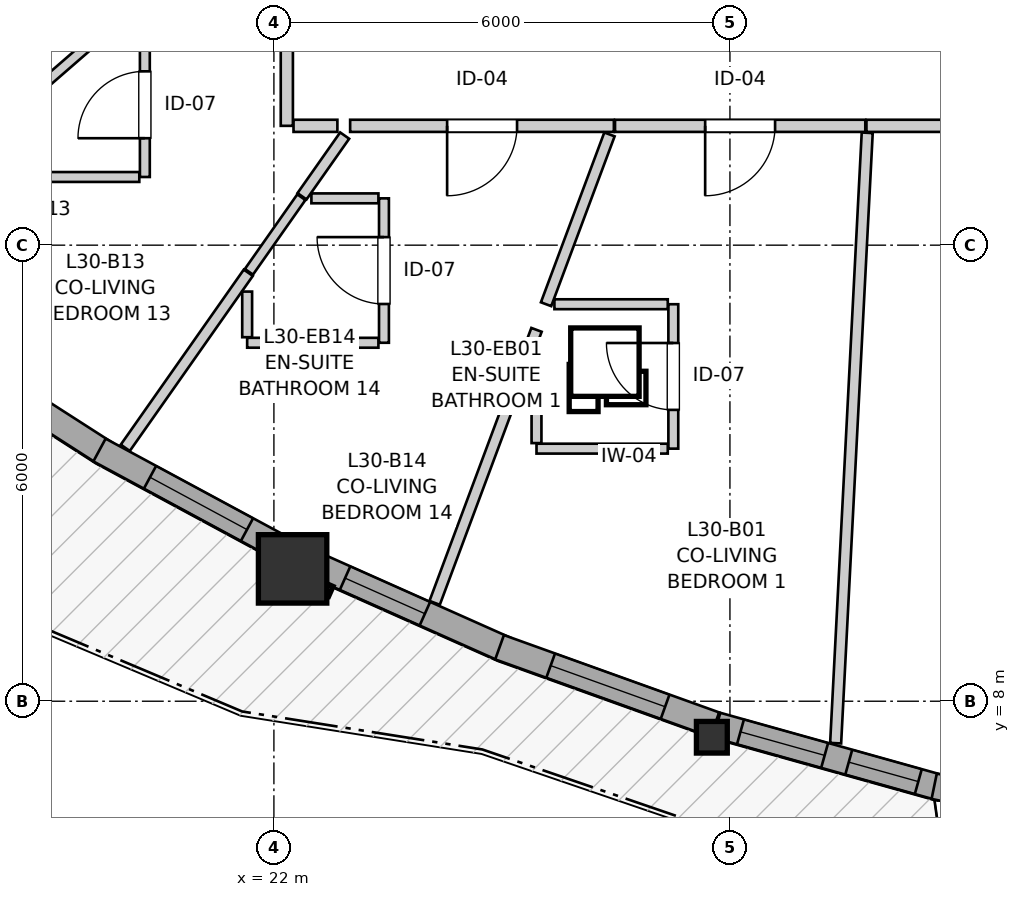
"""IFC4 building model, lengths in metres.
Left out: names, types, materials, properties, quantities, classifications, styles, units other than length and angle.
Written with IfcOpenShell. Run it as: python <this file> out.ifc"""

import sys

from ifc_helpers import new_model, si_unit, direction, frame, frame_2d, origin, origin_2d, place, context, subcontext, project, spatial, rectangle, i_section, extrude, source, transform, mapped, element, fill, save


model = new_model("IFC4")
c1 = context("Model", 3, precision=1e-05, world=origin(), true_north=direction((0.0, 1.0)))
c2 = subcontext(c1, "Body", "Model", "MODEL_VIEW")
j1 = project(units=[si_unit("LENGTHUNIT", "METRE"), si_unit("PLANEANGLEUNIT", "RADIAN")], contexts=[c1])
p1 = place(None, origin())
s1 = spatial("IfcSite", under=j1, at=p1, CompositionType="ELEMENT")
p2 = place(p1, origin())
s2 = spatial("IfcBuilding", under=s1, at=p2, CompositionType="ELEMENT")
p3 = place(p2, frame((0.0, 0.0, 102.4)))
s3 = spatial("IfcBuildingStorey", under=s2, at=p3, CompositionType="ELEMENT", Elevation=102.4)
m1 = source(origin(), c2, "Body", "SweptSolid", [
    extrude(rectangle(XDim=0.9, YDim=0.9, at=origin_2d()), origin(), (0.0, 0.0, 1.0), 2.95),
])
p4 = place(p3, frame((22.246, 9.741, 0.0), z_axis=(0.0, 0.0, 1.0), x_axis=(1.0, 0.0, 0.0)))
e1 = element("IfcColumn", 1, at=p4, inside=s3, PredefinedType="COLUMN", context=c2, shape_type="MappedRepresentation", body=[
    mapped(m1, transform((0.0, 0.0, 0.0), x_axis=(1.0, 0.0, 0.0), y_axis=(0.0, 1.0, 0.0), z_axis=(0.0, 0.0, 1.0), scale=1.0)),
])
m2 = source(origin(), c2, "Body", "SweptSolid", [
    extrude(i_section(OverallWidth=0.406, OverallDepth=0.416, WebThickness=0.027, FlangeThickness=0.044, FilletRadius=0.015, at=origin_2d()), origin(), (0.0, 0.0, 1.0), 2.95),
])
p5 = place(p3, frame((27.762, 7.526, 0.0), z_axis=(0.0, 0.0, 1.0), x_axis=(1.0, 0.0, 0.0)))
e2 = element("IfcColumn", 2, at=p5, inside=s3, PredefinedType="PILASTER", context=c2, shape_type="MappedRepresentation", body=[
    mapped(m2, transform((0.0, 0.0, 0.0), x_axis=(1.0, 0.0, 0.0), y_axis=(0.0, 1.0, 0.0), z_axis=(0.0, 0.0, 1.0), scale=1.0)),
])
p6 = place(p3, frame((17.292, 12.858, 0.0), z_axis=(0.0, 0.0, 1.0), x_axis=(0.841524200167, -0.540219418878, 0.0)))
e3 = element("IfcWall", 3, at=p6, inside=s3, PredefinedType="SOLIDWALL", context=c2, shape_type="SweptSolid", body=[
    extrude(rectangle(XDim=2.958, YDim=0.34, at=frame_2d((1.479, 0.0))), origin(), (0.0, 0.0, 1.0), 2.48),
])
p7 = place(p6, frame((0.944, 0.0, 0.82)))
e4 = element("IfcOpeningElement", 4, at=p7, cuts=e3, PredefinedType="OPENING", context=c2, shape_type="SweptSolid", body=[
    extrude(rectangle(XDim=1.05, YDim=1.45, at=frame_2d((0.525, 0.725))), frame((0.0, 0.18, 0.0), z_axis=(0.0, -1.0, 0.0), x_axis=(1.0, 0.0, 0.0)), (0.0, 0.0, 1.0), 0.36),
])
p8 = place(p3, frame((19.705, 11.305, 0.0), z_axis=(0.0, 0.0, 1.0), x_axis=(0.880065774925, -0.474851799834, 0.0)))
e5 = element("IfcWall", 5, at=p8, inside=s3, PredefinedType="SOLIDWALL", context=c2, shape_type="SweptSolid", body=[
    extrude(rectangle(XDim=2.749, YDim=0.34, at=frame_2d((1.374, 0.0))), origin(), (0.0, 0.0, 1.0), 2.48),
])
p9 = place(p8, frame((0.755, 0.0, 0.82)))
e6 = element("IfcOpeningElement", 6, at=p9, cuts=e5, PredefinedType="OPENING", context=c2, shape_type="SweptSolid", body=[
    extrude(rectangle(XDim=1.45, YDim=1.25, at=frame_2d((0.725, 0.625))), frame((0.0, 0.18, 0.0), z_axis=(0.0, -1.0, 0.0), x_axis=(1.0, 0.0, 0.0)), (0.0, 0.0, 1.0), 0.36),
])
p10 = place(p3, frame((22.525, 9.803, 0.0), z_axis=(0.0, 0.0, 1.0), x_axis=(0.913407022137, -0.407047432016, 0.0)))
e7 = element("IfcWall", 7, at=p10, inside=s3, PredefinedType="SOLIDWALL", context=c2, shape_type="SweptSolid", body=[
    extrude(rectangle(XDim=2.766, YDim=0.34, at=frame_2d((1.383, 0.0))), origin(), (0.0, 0.0, 1.0), 2.48),
])
p11 = place(p10, frame((0.45, 0.0, 0.82)))
e8 = element("IfcOpeningElement", 8, at=p11, cuts=e7, PredefinedType="OPENING", context=c2, shape_type="SweptSolid", body=[
    extrude(rectangle(XDim=1.15, YDim=1.2, at=frame_2d((0.575, 0.6))), frame((0.0, 0.18, 0.0), z_axis=(0.0, -1.0, 0.0), x_axis=(1.0, 0.0, 0.0)), (0.0, 0.0, 1.0), 0.36),
])
p12 = place(p3, frame((24.969, 8.71, 0.0), z_axis=(0.0, 0.0, 1.0), x_axis=(0.94111062187, -0.338098798287, 0.0)))
e9 = element("IfcWall", 9, at=p12, inside=s3, PredefinedType="SOLIDWALL", context=c2, shape_type="SweptSolid", body=[
    extrude(rectangle(XDim=3.009, YDim=0.34, at=frame_2d((1.504, 0.0))), origin(), (0.0, 0.0, 1.0), 2.48),
])
p13 = place(p12, frame((0.714, 0.0, 0.82)))
e10 = element("IfcOpeningElement", 10, at=p13, cuts=e9, PredefinedType="OPENING", context=c2, shape_type="SweptSolid", body=[
    extrude(rectangle(XDim=1.6, YDim=1.35, at=frame_2d((0.8, 0.675))), frame((0.0, 0.18, 0.0), z_axis=(0.0, -1.0, 0.0), x_axis=(1.0, 0.0, 0.0)), (0.0, 0.0, 1.0), 0.36),
])
p14 = place(p3, frame((27.827, 7.684, 0.0), z_axis=(0.0, 0.0, 1.0), x_axis=(0.963051015651, -0.269319032475, 0.0)))
e11 = element("IfcWall", 11, at=p14, inside=s3, PredefinedType="SOLIDWALL", context=c2, shape_type="SweptSolid", body=[
    extrude(rectangle(XDim=3.059, YDim=0.34, at=frame_2d((1.529, 0.0))), origin(), (0.0, 0.0, 1.0), 2.48),
])
p15 = place(p14, frame((0.323, 0.0, 0.82)))
e12 = element("IfcOpeningElement", 12, at=p15, cuts=e11, PredefinedType="OPENING", context=c2, shape_type="SweptSolid", body=[
    extrude(rectangle(XDim=1.15, YDim=1.2, at=frame_2d((0.575, 0.6))), frame((0.0, 0.18, 0.0), z_axis=(0.0, -1.0, 0.0), x_axis=(1.0, 0.0, 0.0)), (0.0, 0.0, 1.0), 0.36),
])
p16 = place(p14, frame((1.803, 0.0, 0.82)))
e13 = element("IfcOpeningElement", 13, at=p16, cuts=e11, PredefinedType="OPENING", context=c2, shape_type="SweptSolid", body=[
    extrude(rectangle(XDim=0.95, YDim=1.35, at=frame_2d((0.475, 0.675))), frame((0.0, 0.18, 0.0), z_axis=(0.0, -1.0, 0.0), x_axis=(1.0, 0.0, 0.0)), (0.0, 0.0, 1.0), 0.36),
])
p17 = place(p3, frame((30.687, 6.881, 0.0), z_axis=(0.0, 0.0, 1.0), x_axis=(0.979429773913, -0.201785326453, 0.0)))
e14 = element("IfcWall", 14, at=p17, inside=s3, PredefinedType="SOLIDWALL", context=c2, shape_type="SweptSolid", body=[
    extrude(rectangle(XDim=2.913, YDim=0.34, at=frame_2d((1.457, 0.0))), origin(), (0.0, 0.0, 1.0), 2.48),
])
p18 = place(p17, frame((0.837, 0.0, 0.82)))
e15 = element("IfcOpeningElement", 15, at=p18, cuts=e14, PredefinedType="OPENING", context=c2, shape_type="SweptSolid", body=[
    extrude(rectangle(XDim=1.25, YDim=1.35, at=frame_2d((0.625, 0.675))), frame((0.0, 0.18, 0.0), z_axis=(0.0, -1.0, 0.0), x_axis=(1.0, 0.0, 0.0)), (0.0, 0.0, 1.0), 0.36),
])
p19 = place(p3, frame((34.373, 15.57, 0.0), z_axis=(0.0, 0.0, 1.0), x_axis=(-1.0, 0.0, 0.0)))
e16 = element("IfcWall", 16, at=p19, inside=s3, PredefinedType="PARTITIONING", context=c2, shape_type="SweptSolid", body=[
    extrude(rectangle(XDim=4.577, YDim=0.16, at=frame_2d((2.289, 0.0))), origin(), (0.0, 0.0, 1.0), 2.95),
])
p20 = place(p19, frame((1.639, 0.0, 0.0)))
e17 = element("IfcOpeningElement", 17, at=p20, cuts=e16, PredefinedType="OPENING", context=c2, shape_type="SweptSolid", body=[
    extrude(rectangle(XDim=1.3, YDim=2.1, at=frame_2d((0.65, 1.05))), frame((0.0, 0.09, 0.0), z_axis=(0.0, -1.0, 0.0), x_axis=(1.0, 0.0, 0.0)), (0.0, 0.0, 1.0), 0.18),
])
p21 = place(p3, frame((26.473, 15.57, 0.0), z_axis=(0.0, 0.0, 1.0), x_axis=(-1.0, 0.0, 0.0)))
e18 = element("IfcWall", 18, at=p21, inside=s3, PredefinedType="PARTITIONING", context=c2, shape_type="SweptSolid", body=[
    extrude(rectangle(XDim=3.47, YDim=0.16, at=frame_2d((1.735, 0.0))), origin(), (0.0, 0.0, 1.0), 2.95),
])
p22 = place(p21, frame((1.274, 0.0, 0.0)))
e19 = element("IfcOpeningElement", 19, at=p22, cuts=e18, PredefinedType="OPENING", context=c2, shape_type="SweptSolid", body=[
    extrude(rectangle(XDim=0.92, YDim=2.1, at=frame_2d((0.46, 1.05))), frame((0.0, 0.09, 0.0), z_axis=(0.0, -1.0, 0.0), x_axis=(1.0, 0.0, 0.0)), (0.0, 0.0, 1.0), 0.18),
])
p23 = place(p3, frame((22.17, 15.57, 0.0), z_axis=(0.0, 0.0, 1.0), x_axis=(0.0, 1.0, 0.0)))
e20 = element("IfcWall", 20, at=p23, inside=s3, PredefinedType="PARTITIONING", context=c2, shape_type="SweptSolid", body=[
    extrude(rectangle(XDim=3.346, YDim=0.16, at=frame_2d((1.673, 0.0))), origin(), (0.0, 0.0, 1.0), 2.95),
])
p24 = place(p23, frame((1.203, 0.0, 0.0)))
e21 = element("IfcOpeningElement", 21, at=p24, cuts=e20, PredefinedType="OPENING", context=c2, shape_type="SweptSolid", body=[
    extrude(rectangle(XDim=0.92, YDim=2.1, at=frame_2d((0.46, 1.05))), frame((0.0, 0.09, 0.0), z_axis=(0.0, -1.0, 0.0), x_axis=(1.0, 0.0, 0.0)), (0.0, 0.0, 1.0), 0.18),
])
p25 = place(p3, frame((29.781, 15.57, 0.0), z_axis=(0.0, 0.0, 1.0), x_axis=(-1.0, 0.0, 0.0)))
e22 = element("IfcWall", 22, at=p25, inside=s3, PredefinedType="PARTITIONING", context=c2, shape_type="SweptSolid", body=[
    extrude(rectangle(XDim=3.293, YDim=0.16, at=frame_2d((1.646, 0.0))), origin(), (0.0, 0.0, 1.0), 2.95),
])
p26 = place(p25, frame((1.187, 0.0, 0.0)))
e23 = element("IfcOpeningElement", 23, at=p26, cuts=e22, PredefinedType="OPENING", context=c2, shape_type="SweptSolid", body=[
    extrude(rectangle(XDim=0.92, YDim=2.1, at=frame_2d((0.46, 1.05))), frame((0.0, 0.09, 0.0), z_axis=(0.0, -1.0, 0.0), x_axis=(1.0, 0.0, 0.0)), (0.0, 0.0, 1.0), 0.18),
])
p27 = place(p3, frame((27.255, 11.323, 0.0), z_axis=(0.0, 0.0, 1.0), x_axis=(0.0, 1.0, 0.0)))
e24 = element("IfcWall", 24, at=p27, inside=s3, PredefinedType="PARTITIONING", context=c2, shape_type="SweptSolid", body=[
    extrude(rectangle(XDim=1.9, YDim=0.13, at=frame_2d((0.95, 0.0))), origin(), (0.0, 0.0, 1.0), 2.95),
])
p28 = place(p27, frame((0.51, 0.0, 0.0)))
e25 = element("IfcOpeningElement", 25, at=p28, cuts=e24, PredefinedType="OPENING", context=c2, shape_type="SweptSolid", body=[
    extrude(rectangle(XDim=0.88, YDim=2.05, at=frame_2d((0.44, 1.025))), frame((0.0, 0.075, 0.0), z_axis=(0.0, -1.0, 0.0), x_axis=(1.0, 0.0, 0.0)), (0.0, 0.0, 1.0), 0.15),
])
p29 = place(p3, frame((20.302, 14.897, 0.0), z_axis=(0.0, 0.0, 1.0), x_axis=(0.0, 1.0, 0.0)))
e26 = element("IfcWall", 26, at=p29, inside=s3, PredefinedType="PARTITIONING", context=c2, shape_type="SweptSolid", body=[
    extrude(rectangle(XDim=1.9, YDim=0.13, at=frame_2d((0.95, 0.0))), origin(), (0.0, 0.0, 1.0), 2.95),
])
p30 = place(p29, frame((0.51, 0.0, 0.0)))
e27 = element("IfcOpeningElement", 27, at=p30, cuts=e26, PredefinedType="OPENING", context=c2, shape_type="SweptSolid", body=[
    extrude(rectangle(XDim=0.88, YDim=2.05, at=frame_2d((0.44, 1.025))), frame((0.0, 0.075, 0.0), z_axis=(0.0, -1.0, 0.0), x_axis=(1.0, 0.0, 0.0)), (0.0, 0.0, 1.0), 0.15),
])
p31 = place(p3, frame((23.448, 12.716, 0.0), z_axis=(0.0, 0.0, 1.0), x_axis=(0.0, 1.0, 0.0)))
e28 = element("IfcWall", 28, at=p31, inside=s3, PredefinedType="PARTITIONING", context=c2, shape_type="SweptSolid", body=[
    extrude(rectangle(XDim=1.9, YDim=0.13, at=frame_2d((0.95, 0.0))), origin(), (0.0, 0.0, 1.0), 2.95),
])
p32 = place(p31, frame((0.51, 0.0, 0.0)))
e29 = element("IfcOpeningElement", 29, at=p32, cuts=e28, PredefinedType="OPENING", context=c2, shape_type="SweptSolid", body=[
    extrude(rectangle(XDim=0.88, YDim=2.05, at=frame_2d((0.44, 1.025))), frame((0.0, 0.075, 0.0), z_axis=(0.0, -1.0, 0.0), x_axis=(1.0, 0.0, 0.0)), (0.0, 0.0, 1.0), 0.15),
])
p33 = place(p3, frame((13.622, 16.028, 0.0), z_axis=(0.0, 0.0, 1.0), x_axis=(0.85896108151, 0.512040877716, 0.0)))
e30 = element("IfcWall", 30, at=p33, inside=s3, PredefinedType="PARTITIONING", context=c2, shape_type="SweptSolid", body=[
    extrude(rectangle(XDim=9.807, YDim=0.145, at=frame_2d((4.904, 0.0))), origin(), (0.0, 0.0, 1.0), 2.95),
])
p34 = place(p3, frame((29.391, 7.448, 0.0), z_axis=(0.0, 0.0, 1.0), x_axis=(0.051677535725, 0.998663823467, 0.0)))
e31 = element("IfcWall", 31, at=p34, inside=s3, PredefinedType="PARTITIONING", context=c2, shape_type="SweptSolid", body=[
    extrude(rectangle(XDim=8.041, YDim=0.145, at=frame_2d((4.021, 0.0))), origin(), (0.0, 0.0, 1.0), 2.95),
])
p35 = place(p3, frame((24.115, 9.294, 0.0), z_axis=(0.0, 0.0, 1.0), x_axis=(0.349559649022, 0.936914111205, 0.0)))
e32 = element("IfcWall", 32, at=p35, inside=s3, PredefinedType="PARTITIONING", context=c2, shape_type="SweptSolid", body=[
    extrude(rectangle(XDim=3.834, YDim=0.145, at=frame_2d((1.917, 0.0))), origin(), (0.0, 0.0, 1.0), 2.95),
])
p36 = place(p3, frame((20.044, 11.334, 0.0), z_axis=(0.0, 0.0, 1.0), x_axis=(0.575027113175, 0.818134352728, 0.0)))
e33 = element("IfcWall", 33, at=p36, inside=s3, PredefinedType="PARTITIONING", context=c2, shape_type="SweptSolid", body=[
    extrude(rectangle(XDim=2.815, YDim=0.145, at=frame_2d((1.407, 0.0))), origin(), (0.0, 0.0, 1.0), 2.95),
])
p37 = place(p3, frame((25.581, 13.223, 0.0), z_axis=(0.0, 0.0, 1.0), x_axis=(0.349597225683, 0.936900090615, 0.0)))
e34 = element("IfcWall", 34, at=p37, inside=s3, PredefinedType="PARTITIONING", context=c2, shape_type="SweptSolid", body=[
    extrude(rectangle(XDim=2.385, YDim=0.145, at=frame_2d((1.192, 0.0))), origin(), (0.0, 0.0, 1.0), 2.95),
])
p38 = place(p3, frame((25.455, 11.323, 0.0), z_axis=(0.0, 0.0, 1.0), x_axis=(1.0, 0.0, 0.0)))
e35 = element("IfcWall", 35, at=p38, inside=s3, PredefinedType="PARTITIONING", context=c2, shape_type="SweptSolid", body=[
    extrude(rectangle(XDim=1.727, YDim=0.13, at=frame_2d((0.863, 0.0))), origin(), (0.0, 0.0, 1.0), 2.558),
])
for number, where, z_axis, x_axis in (
    (36, (18.502, 14.897, 0.0), (0.0, 0.0, 1.0), (1.0, 0.0, 0.0)),
    (37, (21.648, 12.716, 0.0), (0.0, 0.0, 1.0), (1.0, 0.0, 0.0)),
):
    element("IfcWall", number, at=place(p3, frame(where, z_axis=z_axis, x_axis=x_axis)), inside=s3, PredefinedType="PARTITIONING", context=c2, shape_type="SweptSolid", body=[
        extrude(rectangle(XDim=1.727, YDim=0.13, at=frame_2d((0.864, 0.0))), origin(), (0.0, 0.0, 1.0), 2.95),
    ])
p39 = place(p3, frame((25.691, 13.223, 0.0), z_axis=(0.0, 0.0, 1.0), x_axis=(1.0, 0.0, 0.0)))
e38 = element("IfcWall", 38, at=p39, inside=s3, PredefinedType="PARTITIONING", context=c2, shape_type="SweptSolid", body=[
    extrude(rectangle(XDim=1.491, YDim=0.13, at=frame_2d((0.746, 0.0))), origin(), (0.0, 0.0, 1.0), 2.95),
])
p40 = place(p3, frame((18.528, 15.734, 0.0), z_axis=(0.0, 0.0, 1.0), x_axis=(0.755063236967, 0.655651971843, 0.0)))
e39 = element("IfcWall", 39, at=p40, inside=s3, PredefinedType="PARTITIONING", context=c2, shape_type="SweptSolid", body=[
    extrude(rectangle(XDim=1.584, YDim=0.13, at=frame_2d((0.792, 0.0))), origin(), (0.0, 0.0, 1.0), 2.95),
])
p41 = place(p3, frame((25.455, 11.396, 0.0), z_axis=(0.0, 0.0, 1.0), x_axis=(0.0, 1.0, 0.0)))
e40 = element("IfcWall", 40, at=p41, inside=s3, PredefinedType="PARTITIONING", context=c2, shape_type="SweptSolid", body=[
    extrude(rectangle(XDim=1.25, YDim=0.13, at=frame_2d((0.625, 0.0))), origin(), (0.0, 0.0, 1.0), 2.95),
])
p42 = place(p3, frame((21.671, 13.649, 0.0), z_axis=(0.0, 0.0, 1.0), x_axis=(0.574868196693, 0.81824602439, 0.0)))
e41 = element("IfcWall", 41, at=p42, inside=s3, PredefinedType="PARTITIONING", context=c2, shape_type="SweptSolid", body=[
    extrude(rectangle(XDim=1.2, YDim=0.13, at=frame_2d((0.6, 0.0))), origin(), (0.0, 0.0, 1.0), 2.95),
])
p43 = place(p3, frame((22.37, 14.643, 0.0), z_axis=(0.0, 0.0, 1.0), x_axis=(0.575022445487, 0.818137633401, 0.0)))
e42 = element("IfcWall", 42, at=p43, inside=s3, PredefinedType="PARTITIONING", context=c2, shape_type="SweptSolid", body=[
    extrude(rectangle(XDim=0.976, YDim=0.145, at=frame_2d((0.488, 0.0))), origin(), (0.0, 0.0, 1.0), 2.95),
])
p44 = place(p3, frame((22.493, 14.616, 0.0), z_axis=(0.0, 0.0, 1.0), x_axis=(1.0, 0.0, 0.0)))
e43 = element("IfcWall", 43, at=p44, inside=s3, PredefinedType="PARTITIONING", context=c2, shape_type="SweptSolid", body=[
    extrude(rectangle(XDim=0.882, YDim=0.13, at=frame_2d((0.441, 0.0))), origin(), (0.0, 0.0, 1.0), 2.95),
])
p45 = place(p3, frame((21.648, 12.789, 0.0), z_axis=(0.0, 0.0, 1.0), x_axis=(0.0, 1.0, 0.0)))
e44 = element("IfcWall", 44, at=p45, inside=s3, PredefinedType="PARTITIONING", context=c2, shape_type="SweptSolid", body=[
    extrude(rectangle(XDim=0.6, YDim=0.13, at=frame_2d((0.3, 0.0))), origin(), (0.0, 0.0, 1.0), 2.95),
])
p46 = place(p3, frame((22.258, 15.57, 0.0), z_axis=(0.0, 0.0, 1.0), x_axis=(1.0, 0.0, 0.0)))
e45 = element("IfcWall", 45, at=p46, inside=s3, PredefinedType="PARTITIONING", context=c2, shape_type="SweptSolid", body=[
    extrude(rectangle(XDim=0.577, YDim=0.16, at=frame_2d((0.289, 0.0))), origin(), (0.0, 0.0, 1.0), 2.95),
])
m3 = source(origin(), c2, "Body", "SweptSolid", [
    extrude(rectangle(XDim=1.45, YDim=1.25, at=frame_2d((0.725, 0.625))), frame((0.0, 0.03, 0.0), z_axis=(0.0, -1.0, 0.0), x_axis=(1.0, 0.0, 0.0)), (0.0, 0.0, 1.0), 0.06),
])
p47 = place(p9, origin())
e46 = element("IfcWindow", 46, at=p47, inside=s3, PartitioningType="SINGLE_PANEL", PredefinedType="WINDOW", context=c2, shape_type="MappedRepresentation", body=[
    mapped(m3, transform((0.0, 0.0, 0.0), x_axis=(1.0, 0.0, 0.0), y_axis=(0.0, 1.0, 0.0), z_axis=(0.0, 0.0, 1.0), scale=1.0)),
])
fill(e6, e46)
m4 = source(origin(), c2, "Body", "SweptSolid", [
    extrude(rectangle(XDim=1.15, YDim=1.2, at=frame_2d((0.575, 0.6))), frame((0.0, 0.03, 0.0), z_axis=(0.0, -1.0, 0.0), x_axis=(1.0, 0.0, 0.0)), (0.0, 0.0, 1.0), 0.06),
])
p48 = place(p11, origin())
e47 = element("IfcWindow", 47, at=p48, inside=s3, PartitioningType="SINGLE_PANEL", PredefinedType="WINDOW", context=c2, shape_type="MappedRepresentation", body=[
    mapped(m4, transform((0.0, 0.0, 0.0), x_axis=(1.0, 0.0, 0.0), y_axis=(0.0, 1.0, 0.0), z_axis=(0.0, 0.0, 1.0), scale=1.0)),
])
fill(e8, e47)
m5 = source(origin(), c2, "Body", "SweptSolid", [
    extrude(rectangle(XDim=1.6, YDim=1.35, at=frame_2d((0.8, 0.675))), frame((0.0, 0.03, 0.0), z_axis=(0.0, -1.0, 0.0), x_axis=(1.0, 0.0, 0.0)), (0.0, 0.0, 1.0), 0.06),
])
p49 = place(p13, origin())
e48 = element("IfcWindow", 48, at=p49, inside=s3, PartitioningType="SINGLE_PANEL", PredefinedType="WINDOW", context=c2, shape_type="MappedRepresentation", body=[
    mapped(m5, transform((0.0, 0.0, 0.0), x_axis=(1.0, 0.0, 0.0), y_axis=(0.0, 1.0, 0.0), z_axis=(0.0, 0.0, 1.0), scale=1.0)),
])
fill(e10, e48)
p50 = place(p15, origin())
e49 = element("IfcWindow", 49, at=p50, inside=s3, PartitioningType="SINGLE_PANEL", PredefinedType="WINDOW", context=c2, shape_type="MappedRepresentation", body=[
    mapped(m4, transform((0.0, 0.0, 0.0), x_axis=(1.0, 0.0, 0.0), y_axis=(0.0, 1.0, 0.0), z_axis=(0.0, 0.0, 1.0), scale=1.0)),
])
fill(e12, e49)
m6 = source(origin(), c2, "Body", "SweptSolid", [
    extrude(rectangle(XDim=0.95, YDim=1.35, at=frame_2d((0.475, 0.675))), frame((0.0, 0.03, 0.0), z_axis=(0.0, -1.0, 0.0), x_axis=(1.0, 0.0, 0.0)), (0.0, 0.0, 1.0), 0.06),
])
p51 = place(p16, origin())
e50 = element("IfcWindow", 50, at=p51, inside=s3, PartitioningType="SINGLE_PANEL", PredefinedType="WINDOW", context=c2, shape_type="MappedRepresentation", body=[
    mapped(m6, transform((0.0, 0.0, 0.0), x_axis=(1.0, 0.0, 0.0), y_axis=(0.0, 1.0, 0.0), z_axis=(0.0, 0.0, 1.0), scale=1.0)),
])
fill(e13, e50)
m7 = source(origin(), c2, "Body", "SweptSolid", [
    extrude(rectangle(XDim=0.92, YDim=2.1, at=frame_2d((0.46, 1.05))), frame((0.0, 0.025, 0.0), z_axis=(0.0, -1.0, 0.0), x_axis=(1.0, 0.0, 0.0)), (0.0, 0.0, 1.0), 0.05),
])
p52 = place(p22, origin())
e51 = element("IfcDoor", 51, at=p52, inside=s3, OperationType="SINGLE_SWING_RIGHT", PredefinedType="DOOR", context=c2, shape_type="MappedRepresentation", body=[
    mapped(m7, transform((0.0, 0.0, 0.0), x_axis=(1.0, 0.0, 0.0), y_axis=(0.0, 1.0, 0.0), z_axis=(0.0, 0.0, 1.0), scale=1.0)),
])
fill(e19, e51)
p53 = place(p26, origin())
e52 = element("IfcDoor", 52, at=p53, inside=s3, OperationType="SINGLE_SWING_RIGHT", PredefinedType="DOOR", context=c2, shape_type="MappedRepresentation", body=[
    mapped(m7, transform((0.0, 0.0, 0.0), x_axis=(1.0, 0.0, 0.0), y_axis=(0.0, 1.0, 0.0), z_axis=(0.0, 0.0, 1.0), scale=1.0)),
])
fill(e23, e52)
m8 = source(origin(), c2, "Body", "SweptSolid", [
    extrude(rectangle(XDim=0.88, YDim=2.05, at=frame_2d((0.44, 1.025))), frame((0.0, 0.025, 0.0), z_axis=(0.0, -1.0, 0.0), x_axis=(1.0, 0.0, 0.0)), (0.0, 0.0, 1.0), 0.05),
])
p54 = place(p28, origin())
e53 = element("IfcDoor", 53, at=p54, inside=s3, OperationType="SINGLE_SWING_RIGHT", PredefinedType="DOOR", context=c2, shape_type="MappedRepresentation", body=[
    mapped(m8, transform((0.0, 0.0, 0.0), x_axis=(1.0, 0.0, 0.0), y_axis=(0.0, 1.0, 0.0), z_axis=(0.0, 0.0, 1.0), scale=1.0)),
])
fill(e25, e53)
p55 = place(p30, origin())
e54 = element("IfcDoor", 54, at=p55, inside=s3, OperationType="SINGLE_SWING_LEFT", PredefinedType="DOOR", context=c2, shape_type="MappedRepresentation", body=[
    mapped(m8, transform((0.0, 0.0, 0.0), x_axis=(1.0, 0.0, 0.0), y_axis=(0.0, 1.0, 0.0), z_axis=(0.0, 0.0, 1.0), scale=1.0)),
])
fill(e27, e54)
p56 = place(p32, origin())
e55 = element("IfcDoor", 55, at=p56, inside=s3, OperationType="SINGLE_SWING_RIGHT", PredefinedType="DOOR", context=c2, shape_type="MappedRepresentation", body=[
    mapped(m8, transform((0.0, 0.0, 0.0), x_axis=(1.0, 0.0, 0.0), y_axis=(0.0, 1.0, 0.0), z_axis=(0.0, 0.0, 1.0), scale=1.0)),
])
fill(e29, e55)
save(model, sys.argv[1])
